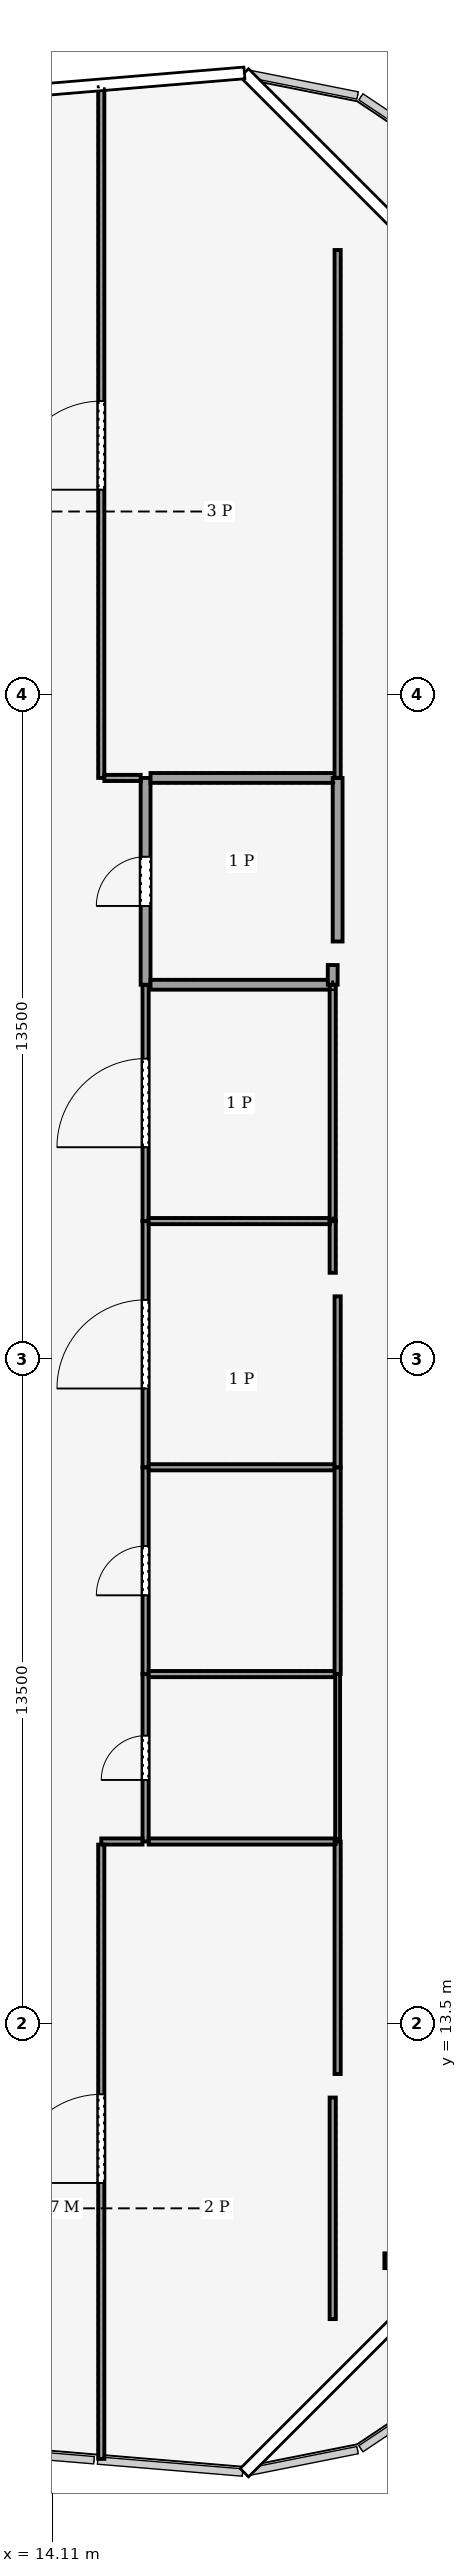
"""IFC4 building model, lengths in metres.
Left out: names, types, materials, properties, quantities, classifications, styles, units other than length and angle.
Written with IfcOpenShell. Run it as: python <this file> out.ifc"""

import sys

from ifc_helpers import new_model, si_unit, direction, frame, frame_2d, origin, origin_2d, place, context, subcontext, project, spatial, rectangle, hollow_rectangle, i_section, extrude, element, fill, save


model = new_model("IFC4")
c1 = context("Model", 3, precision=1e-05, world=origin(), true_north=direction((0.0, 1.0)))
c2 = subcontext(c1, "Body", "Model", "MODEL_VIEW")
j1 = project(units=[si_unit("LENGTHUNIT", "METRE"), si_unit("PLANEANGLEUNIT", "RADIAN")], contexts=[c1])
p1 = place(None, origin())
s1 = spatial("IfcSite", under=j1, at=p1, CompositionType="ELEMENT")
p2 = place(p1, origin())
s2 = spatial("IfcBuilding", under=s1, at=p2, CompositionType="ELEMENT")
p3 = place(p2, frame((0.0, 0.0, 114.0)))
s3 = spatial("IfcBuildingStorey", under=s2, at=p3, CompositionType="ELEMENT", Elevation=114.0)
p4 = place(p3, frame((21.0, 50.0, 0.573), z_axis=(0.0, 0.8070371961, 0.590500604666), x_axis=(-1.0, 0.0, 0.0)))
e1 = element("IfcColumn", 1, at=p4, inside=s3, PredefinedType="COLUMN", context=c2, shape_type="SweptSolid", body=[
    extrude(hollow_rectangle(XDim=1.4, YDim=1.4, WallThickness=0.08, at=origin_2d()), origin(), (0.0, 0.0, 1.0), 9.913),
])
p5 = place(p3, frame((21.0, 28.75, 0.517), z_axis=(0.0, 0.723360676074, 0.690470370334), x_axis=(-1.0, 0.0, 0.0)))
e2 = element("IfcColumn", 2, at=p5, inside=s3, PredefinedType="COLUMN", context=c2, shape_type="SweptSolid", body=[
    extrude(hollow_rectangle(XDim=1.4, YDim=1.4, WallThickness=0.08, at=origin_2d()), origin(), (0.0, 0.0, 1.0), 8.64),
])
p6 = place(p3, frame((21.0, 7.5, 0.431), z_axis=(0.0, 0.591280217963, 0.806466182704), x_axis=(-1.0, 0.0, 0.0)))
e3 = element("IfcColumn", 3, at=p6, inside=s3, PredefinedType="COLUMN", context=c2, shape_type="SweptSolid", body=[
    extrude(hollow_rectangle(XDim=1.4, YDim=1.4, WallThickness=0.08, at=origin_2d()), origin(), (0.0, 0.0, 1.0), 7.611),
])
p7 = place(p3, frame((21.0, 8.686, 3.437), z_axis=(0.0, 0.0, 1.0), x_axis=(1.0, 0.0, 0.0)))
e4 = element("IfcColumn", 4, at=p7, inside=s3, PredefinedType="COLUMN", context=c2, shape_type="SweptSolid", body=[
    extrude(i_section(OverallWidth=0.3, OverallDepth=0.3, WebThickness=0.011, FlangeThickness=0.019, FilletRadius=0.027, at=origin_2d()), origin(), (0.0, 0.0, 1.0), 3.263),
])
p8 = place(p3, frame((16.0, 17.2, 0.0), z_axis=(0.0, 0.0, 1.0), x_axis=(0.0, 1.0, 0.0)))
e5 = element("IfcWall", 5, at=p8, inside=s3, PredefinedType="PARTITIONING", context=c2, shape_type="SweptSolid", body=[
    extrude(rectangle(XDim=3.4, YDim=0.125, at=frame_2d((1.7, 0.0))), origin(), (0.0, 0.0, 1.0), 6.14),
])
p9 = place(p8, frame((1.25, 0.0, 0.0)))
e6 = element("IfcOpeningElement", 6, at=p9, cuts=e5, PredefinedType="OPENING", context=c2, shape_type="SweptSolid", body=[
    extrude(rectangle(XDim=0.9, YDim=2.1, at=frame_2d((0.45, 1.05))), frame((0.0, 0.073, 0.0), z_axis=(0.0, -1.0, 0.0), x_axis=(1.0, 0.0, 0.0)), (0.0, 0.0, 1.0), 0.145),
])
p10 = place(p3, frame((16.0, 20.6, 0.0), z_axis=(0.0, 0.0, 1.0), x_axis=(0.0, 1.0, 0.0)))
e7 = element("IfcWall", 7, at=p10, inside=s3, PredefinedType="PARTITIONING", context=c2, shape_type="SweptSolid", body=[
    extrude(rectangle(XDim=4.2, YDim=0.125, at=frame_2d((2.1, 0.0))), origin(), (0.0, 0.0, 1.0), 6.44),
])
p11 = place(p10, frame((1.6, 0.0, 0.0)))
e8 = element("IfcOpeningElement", 8, at=p11, cuts=e7, PredefinedType="OPENING", context=c2, shape_type="SweptSolid", body=[
    extrude(rectangle(XDim=1.0, YDim=2.1, at=frame_2d((0.5, 1.05))), frame((0.0, 0.073, 0.0), z_axis=(0.0, -1.0, 0.0), x_axis=(1.0, 0.0, 0.0)), (0.0, 0.0, 1.0), 0.145),
])
p12 = place(p3, frame((16.0, 24.8, 0.0), z_axis=(0.0, 0.0, 1.0), x_axis=(0.0, 1.0, 0.0)))
e9 = element("IfcWall", 9, at=p12, inside=s3, PredefinedType="PARTITIONING", context=c2, shape_type="SweptSolid", body=[
    extrude(rectangle(XDim=5.0, YDim=0.125, at=frame_2d((2.5, 0.0))), origin(), (0.0, 0.0, 1.0), 6.44),
])
p13 = place(p12, frame((1.6, 0.0, 0.0)))
e10 = element("IfcOpeningElement", 10, at=p13, cuts=e9, PredefinedType="OPENING", context=c2, shape_type="SweptSolid", body=[
    extrude(rectangle(XDim=1.8, YDim=2.4, at=frame_2d((0.9, 1.2))), frame((0.0, 0.073, 0.0), z_axis=(0.0, -1.0, 0.0), x_axis=(1.0, 0.0, 0.0)), (0.0, 0.0, 1.0), 0.145),
])
p14 = place(p3, frame((16.0, 29.8, 0.0), z_axis=(0.0, 0.0, 1.0), x_axis=(0.0, 1.0, 0.0)))
e11 = element("IfcWall", 11, at=p14, inside=s3, PredefinedType="PARTITIONING", context=c2, shape_type="SweptSolid", body=[
    extrude(rectangle(XDim=4.8, YDim=0.125, at=frame_2d((2.4, 0.0))), origin(), (0.0, 0.0, 1.0), 6.44),
])
p15 = place(p14, frame((1.5, 0.0, 0.0)))
e12 = element("IfcOpeningElement", 12, at=p15, cuts=e11, PredefinedType="OPENING", context=c2, shape_type="SweptSolid", body=[
    extrude(rectangle(XDim=1.8, YDim=2.4, at=frame_2d((0.9, 1.2))), frame((0.0, 0.073, 0.0), z_axis=(0.0, -1.0, 0.0), x_axis=(1.0, 0.0, 0.0)), (0.0, 0.0, 1.0), 0.145),
])
p16 = place(p3, frame((16.0, 34.6, 0.0), z_axis=(0.0, 0.0, 1.0), x_axis=(0.0, 1.0, 0.0)))
e13 = element("IfcWall", 13, at=p16, inside=s3, PredefinedType="PARTITIONING", context=c2, shape_type="SweptSolid", body=[
    extrude(rectangle(XDim=4.2, YDim=0.2, at=frame_2d((2.1, 0.0))), origin(), (0.0, 0.0, 1.0), 6.14),
])
p17 = place(p16, frame((1.6, 0.0, 0.0)))
e14 = element("IfcOpeningElement", 14, at=p17, cuts=e13, PredefinedType="OPENING", context=c2, shape_type="SweptSolid", body=[
    extrude(rectangle(XDim=1.0, YDim=2.1, at=frame_2d((0.5, 1.05))), frame((0.0, 0.11, 0.0), z_axis=(0.0, -1.0, 0.0), x_axis=(1.0, 0.0, 0.0)), (0.0, 0.0, 1.0), 0.22),
])
p18 = place(p3, frame((15.938, 17.2, 0.0), z_axis=(0.0, 0.0, 1.0), x_axis=(-1.0, 0.0, 0.0)))
e15 = element("IfcWall", 15, at=p18, inside=s3, PredefinedType="PARTITIONING", context=c2, shape_type="SweptSolid", body=[
    extrude(rectangle(XDim=0.837, YDim=0.125, at=frame_2d((0.419, 0.0))), origin(), (0.0, 0.0, 1.0), 6.14),
])
p19 = place(p3, frame((15.1, 4.662, 0.0), z_axis=(0.0, 0.0, 1.0), x_axis=(0.0, 1.0, 0.0)))
e16 = element("IfcWall", 16, at=p19, inside=s3, PredefinedType="PARTITIONING", context=c2, shape_type="SweptSolid", body=[
    extrude(rectangle(XDim=12.476, YDim=0.125, at=frame_2d((6.238, 0.0))), origin(), (0.0, 0.0, 1.0), 6.04),
])
p20 = place(p19, frame((5.604, 0.0, 0.0)))
e17 = element("IfcOpeningElement", 17, at=p20, cuts=e16, PredefinedType="OPENING", context=c2, shape_type="SweptSolid", body=[
    extrude(rectangle(XDim=1.8, YDim=2.4, at=frame_2d((0.9, 1.2))), frame((0.0, 0.073, 0.0), z_axis=(0.0, -1.0, 0.0), x_axis=(1.0, 0.0, 0.0)), (0.0, 0.0, 1.0), 0.145),
])
p21 = place(p3, frame((15.1, 38.8, 0.0), z_axis=(0.0, 0.0, 1.0), x_axis=(0.0, 1.0, 0.0)))
e18 = element("IfcWall", 18, at=p21, inside=s3, PredefinedType="PARTITIONING", context=c2, shape_type="SweptSolid", body=[
    extrude(rectangle(XDim=14.038, YDim=0.125, at=frame_2d((7.019, 0.0))), origin(), (0.0, 0.0, 1.0), 6.14),
])
p22 = place(p21, frame((5.854, 0.0, 0.0)))
e19 = element("IfcOpeningElement", 19, at=p22, cuts=e18, PredefinedType="OPENING", context=c2, shape_type="SweptSolid", body=[
    extrude(rectangle(XDim=1.8, YDim=2.4, at=frame_2d((0.9, 1.2))), frame((0.0, 0.073, 0.0), z_axis=(0.0, -1.0, 0.0), x_axis=(1.0, 0.0, 0.0)), (0.0, 0.0, 1.0), 0.145),
])
p23 = place(p3, frame((15.163, 38.8, 0.0), z_axis=(0.0, 0.0, 1.0), x_axis=(1.0, 0.0, 0.0)))
e20 = element("IfcWall", 20, at=p23, inside=s3, PredefinedType="PARTITIONING", context=c2, shape_type="SweptSolid", body=[
    extrude(rectangle(XDim=0.737, YDim=0.125, at=frame_2d((0.369, 0.0))), origin(), (0.0, 0.0, 1.0), 6.14),
])
p24 = place(p3, frame((16.062, 20.6, 0.0), z_axis=(0.0, 0.0, 1.0), x_axis=(1.0, 0.0, 0.0)))
e21 = element("IfcWall", 21, at=p24, inside=s3, PredefinedType="PARTITIONING", context=c2, shape_type="SweptSolid", body=[
    extrude(rectangle(XDim=3.837, YDim=0.125, at=frame_2d((1.919, 0.0))), origin(), (0.0, 0.0, 1.0), 6.87),
])
p25 = place(p3, frame((19.9, 17.2, 0.0), z_axis=(0.0, 0.0, 1.0), x_axis=(-1.0, 0.0, 0.0)))
e22 = element("IfcWall", 22, at=p25, inside=s3, PredefinedType="PARTITIONING", context=c2, shape_type="SweptSolid", body=[
    extrude(rectangle(XDim=3.837, YDim=0.125, at=frame_2d((1.919, 0.0))), origin(), (0.0, 0.0, 1.0), 6.14),
])
p26 = place(p3, frame((16.062, 24.8, 0.0), z_axis=(0.0, 0.0, 1.0), x_axis=(1.0, 0.0, 0.0)))
e23 = element("IfcWall", 23, at=p26, inside=s3, PredefinedType="PARTITIONING", context=c2, shape_type="SweptSolid", body=[
    extrude(rectangle(XDim=3.837, YDim=0.125, at=frame_2d((1.919, 0.0))), origin(), (0.0, 0.0, 1.0), 6.87),
])
p27 = place(p3, frame((16.062, 29.8, 0.0), z_axis=(0.0, 0.0, 1.0), x_axis=(1.0, 0.0, 0.0)))
e24 = element("IfcWall", 24, at=p27, inside=s3, PredefinedType="PARTITIONING", context=c2, shape_type="SweptSolid", body=[
    extrude(rectangle(XDim=3.738, YDim=0.125, at=frame_2d((1.869, 0.0))), origin(), (0.0, 0.0, 1.0), 6.87),
])
p28 = place(p3, frame((16.1, 34.6, 0.0), z_axis=(0.0, 0.0, 1.0), x_axis=(1.0, 0.0, 0.0)))
e25 = element("IfcWall", 25, at=p28, inside=s3, PredefinedType="PARTITIONING", context=c2, shape_type="SweptSolid", body=[
    extrude(rectangle(XDim=3.7, YDim=0.2, at=frame_2d((1.85, 0.0))), origin(), (0.0, 0.0, 1.0), 6.87),
])
p29 = place(p3, frame((16.1, 38.8, 0.0), z_axis=(0.0, 0.0, 1.0), x_axis=(1.0, 0.0, 0.0)))
e26 = element("IfcWall", 26, at=p29, inside=s3, PredefinedType="PARTITIONING", context=c2, shape_type="SweptSolid", body=[
    extrude(rectangle(XDim=3.8, YDim=0.2, at=frame_2d((1.9, 0.0))), origin(), (0.0, 0.0, 1.0), 6.14),
])
p30 = place(p3, frame((19.9, 20.598, 0.0), z_axis=(0.0, 0.0, 1.0), x_axis=(0.0, -1.0, 0.0)))
e27 = element("IfcWall", 27, at=p30, inside=s3, PredefinedType="PARTITIONING", context=c2, shape_type="SweptSolid", body=[
    extrude(rectangle(XDim=3.396, YDim=0.1, at=frame_2d((1.698, 0.0))), origin(), (0.0, 0.0, 1.0), 6.14),
])
p31 = place(p3, frame((19.9, 24.798, 0.0), z_axis=(0.0, 0.0, 1.0), x_axis=(0.0, -1.0, 0.0)))
e28 = element("IfcWall", 28, at=p31, inside=s3, PredefinedType="PARTITIONING", context=c2, shape_type="SweptSolid", body=[
    extrude(rectangle(XDim=4.196, YDim=0.125, at=frame_2d((2.098, 0.0))), origin(), (0.0, 0.0, 1.0), 6.44),
])
p32 = place(p3, frame((19.8, 29.798, 0.0), z_axis=(0.0, 0.0, 1.0), x_axis=(0.0, -1.0, 0.0)))
e29 = element("IfcWall", 29, at=p32, inside=s3, PredefinedType="PARTITIONING", context=c2, shape_type="SweptSolid", body=[
    extrude(rectangle(XDim=1.048, YDim=0.125, at=frame_2d((0.524, 0.0))), origin(), (0.0, 0.0, 1.0), 6.87),
])
p33 = place(p3, frame((19.9, 28.272, 0.0), z_axis=(0.0, 0.0, 1.0), x_axis=(0.0, -1.0, 0.0)))
e30 = element("IfcWall", 30, at=p33, inside=s3, PredefinedType="PARTITIONING", context=c2, shape_type="SweptSolid", body=[
    extrude(rectangle(XDim=3.47, YDim=0.125, at=frame_2d((1.735, 0.0))), origin(), (0.0, 0.0, 1.0), 6.44),
])
p34 = place(p3, frame((19.8, 34.598, 0.0), z_axis=(0.0, 0.0, 1.0), x_axis=(0.0, -1.0, 0.0)))
e31 = element("IfcWall", 31, at=p34, inside=s3, PredefinedType="PARTITIONING", context=c2, shape_type="SweptSolid", body=[
    extrude(rectangle(XDim=4.796, YDim=0.125, at=frame_2d((2.398, 0.0))), origin(), (0.0, 0.0, 1.0), 6.44),
])
p35 = place(p3, frame((19.9, 38.798, 0.0), z_axis=(0.0, 0.0, 1.0), x_axis=(0.0, -1.0, 0.0)))
e32 = element("IfcWall", 32, at=p35, inside=s3, PredefinedType="PARTITIONING", context=c2, shape_type="SweptSolid", body=[
    extrude(rectangle(XDim=3.32, YDim=0.2, at=frame_2d((1.66, 0.0))), origin(), (0.0, 0.0, 1.0), 6.14),
])
p36 = place(p3, frame((19.8, 35.0, 0.0), z_axis=(0.0, 0.0, 1.0), x_axis=(0.0, -1.0, 0.0)))
e33 = element("IfcWall", 33, at=p36, inside=s3, PredefinedType="PARTITIONING", context=c2, shape_type="SweptSolid", body=[
    extrude(rectangle(XDim=0.398, YDim=0.2, at=frame_2d((0.199, 0.0))), origin(), (0.0, 0.0, 1.0), 6.48),
])
p37 = place(p3, frame((19.9, 17.198, 0.0), z_axis=(0.0, 0.0, 1.0), x_axis=(0.0, -1.0, 0.0)))
e34 = element("IfcWall", 34, at=p37, inside=s3, PredefinedType="PARTITIONING", context=c2, shape_type="SweptSolid", body=[
    extrude(rectangle(XDim=4.72, YDim=0.125, at=frame_2d((2.36, 0.0))), origin(), (0.0, 0.0, 1.0), 6.14),
])
p38 = place(p3, frame((19.8, 12.0, 0.0), z_axis=(0.0, 0.0, 1.0), x_axis=(0.0, -1.0, 0.0)))
e35 = element("IfcWall", 35, at=p38, inside=s3, PredefinedType="PARTITIONING", context=c2, shape_type="SweptSolid", body=[
    extrude(rectangle(XDim=4.5, YDim=0.125, at=frame_2d((2.25, 0.0))), origin(), (0.0, 0.0, 1.0), 5.93),
])
p39 = place(p3, frame((19.9, 49.522, 0.0), z_axis=(0.0, 0.0, 1.0), x_axis=(0.0, -1.0, 0.0)))
e36 = element("IfcWall", 36, at=p39, inside=s3, PredefinedType="PARTITIONING", context=c2, shape_type="SweptSolid", body=[
    extrude(rectangle(XDim=10.72, YDim=0.125, at=frame_2d((5.36, 0.0))), origin(), (0.0, 0.0, 1.0), 6.14),
])
p40 = place(p9, origin())
e37 = element("IfcDoor", 37, at=p40, inside=s3, OperationType="SINGLE_SWING_LEFT", PredefinedType="DOOR", context=c2, shape_type="SweptSolid", body=[
    extrude(rectangle(XDim=0.9, YDim=2.1, at=frame_2d((0.45, 1.05))), frame((0.0, 0.025, 0.0), z_axis=(0.0, -1.0, 0.0), x_axis=(1.0, 0.0, 0.0)), (0.0, 0.0, 1.0), 0.05),
])
fill(e6, e37)
p41 = place(p11, origin())
e38 = element("IfcDoor", 38, at=p41, inside=s3, OperationType="SINGLE_SWING_RIGHT", PredefinedType="DOOR", context=c2, shape_type="SweptSolid", body=[
    extrude(rectangle(XDim=1.0, YDim=2.1, at=frame_2d((0.5, 1.05))), frame((0.0, 0.025, 0.0), z_axis=(0.0, -1.0, 0.0), x_axis=(1.0, 0.0, 0.0)), (0.0, 0.0, 1.0), 0.05),
])
fill(e8, e38)
p42 = place(p13, origin())
e39 = element("IfcDoor", 39, at=p42, inside=s3, OperationType="DOUBLE_DOOR_SINGLE_SWING", PredefinedType="DOOR", context=c2, shape_type="SweptSolid", body=[
    extrude(rectangle(XDim=1.8, YDim=2.4, at=frame_2d((0.9, 1.2))), frame((0.0, 0.025, 0.0), z_axis=(0.0, -1.0, 0.0), x_axis=(1.0, 0.0, 0.0)), (0.0, 0.0, 1.0), 0.05),
])
fill(e10, e39)
p43 = place(p15, origin())
e40 = element("IfcDoor", 40, at=p43, inside=s3, OperationType="DOUBLE_DOOR_SINGLE_SWING", PredefinedType="DOOR", context=c2, shape_type="SweptSolid", body=[
    extrude(rectangle(XDim=1.8, YDim=2.4, at=frame_2d((0.9, 1.2))), frame((0.0, 0.025, 0.0), z_axis=(0.0, -1.0, 0.0), x_axis=(1.0, 0.0, 0.0)), (0.0, 0.0, 1.0), 0.05),
])
fill(e12, e40)
p44 = place(p17, origin())
e41 = element("IfcDoor", 41, at=p44, inside=s3, OperationType="SINGLE_SWING_LEFT", PredefinedType="DOOR", context=c2, shape_type="SweptSolid", body=[
    extrude(rectangle(XDim=1.0, YDim=2.1, at=frame_2d((0.5, 1.05))), frame((0.0, 0.025, 0.0), z_axis=(0.0, -1.0, 0.0), x_axis=(1.0, 0.0, 0.0)), (0.0, 0.0, 1.0), 0.05),
])
fill(e14, e41)
p45 = place(p20, origin())
e42 = element("IfcDoor", 42, at=p45, inside=s3, OperationType="DOUBLE_DOOR_SINGLE_SWING", PredefinedType="DOOR", context=c2, shape_type="SweptSolid", body=[
    extrude(rectangle(XDim=1.8, YDim=2.4, at=frame_2d((0.9, 1.2))), frame((0.0, 0.025, 0.0), z_axis=(0.0, -1.0, 0.0), x_axis=(1.0, 0.0, 0.0)), (0.0, 0.0, 1.0), 0.05),
])
fill(e17, e42)
p46 = place(p22, origin())
e43 = element("IfcDoor", 43, at=p46, inside=s3, OperationType="DOUBLE_DOOR_SINGLE_SWING", PredefinedType="DOOR", context=c2, shape_type="SweptSolid", body=[
    extrude(rectangle(XDim=1.8, YDim=2.4, at=frame_2d((0.9, 1.2))), frame((0.0, 0.025, 0.0), z_axis=(0.0, -1.0, 0.0), x_axis=(1.0, 0.0, 0.0)), (0.0, 0.0, 1.0), 0.05),
])
fill(e19, e43)
save(model, sys.argv[1])
